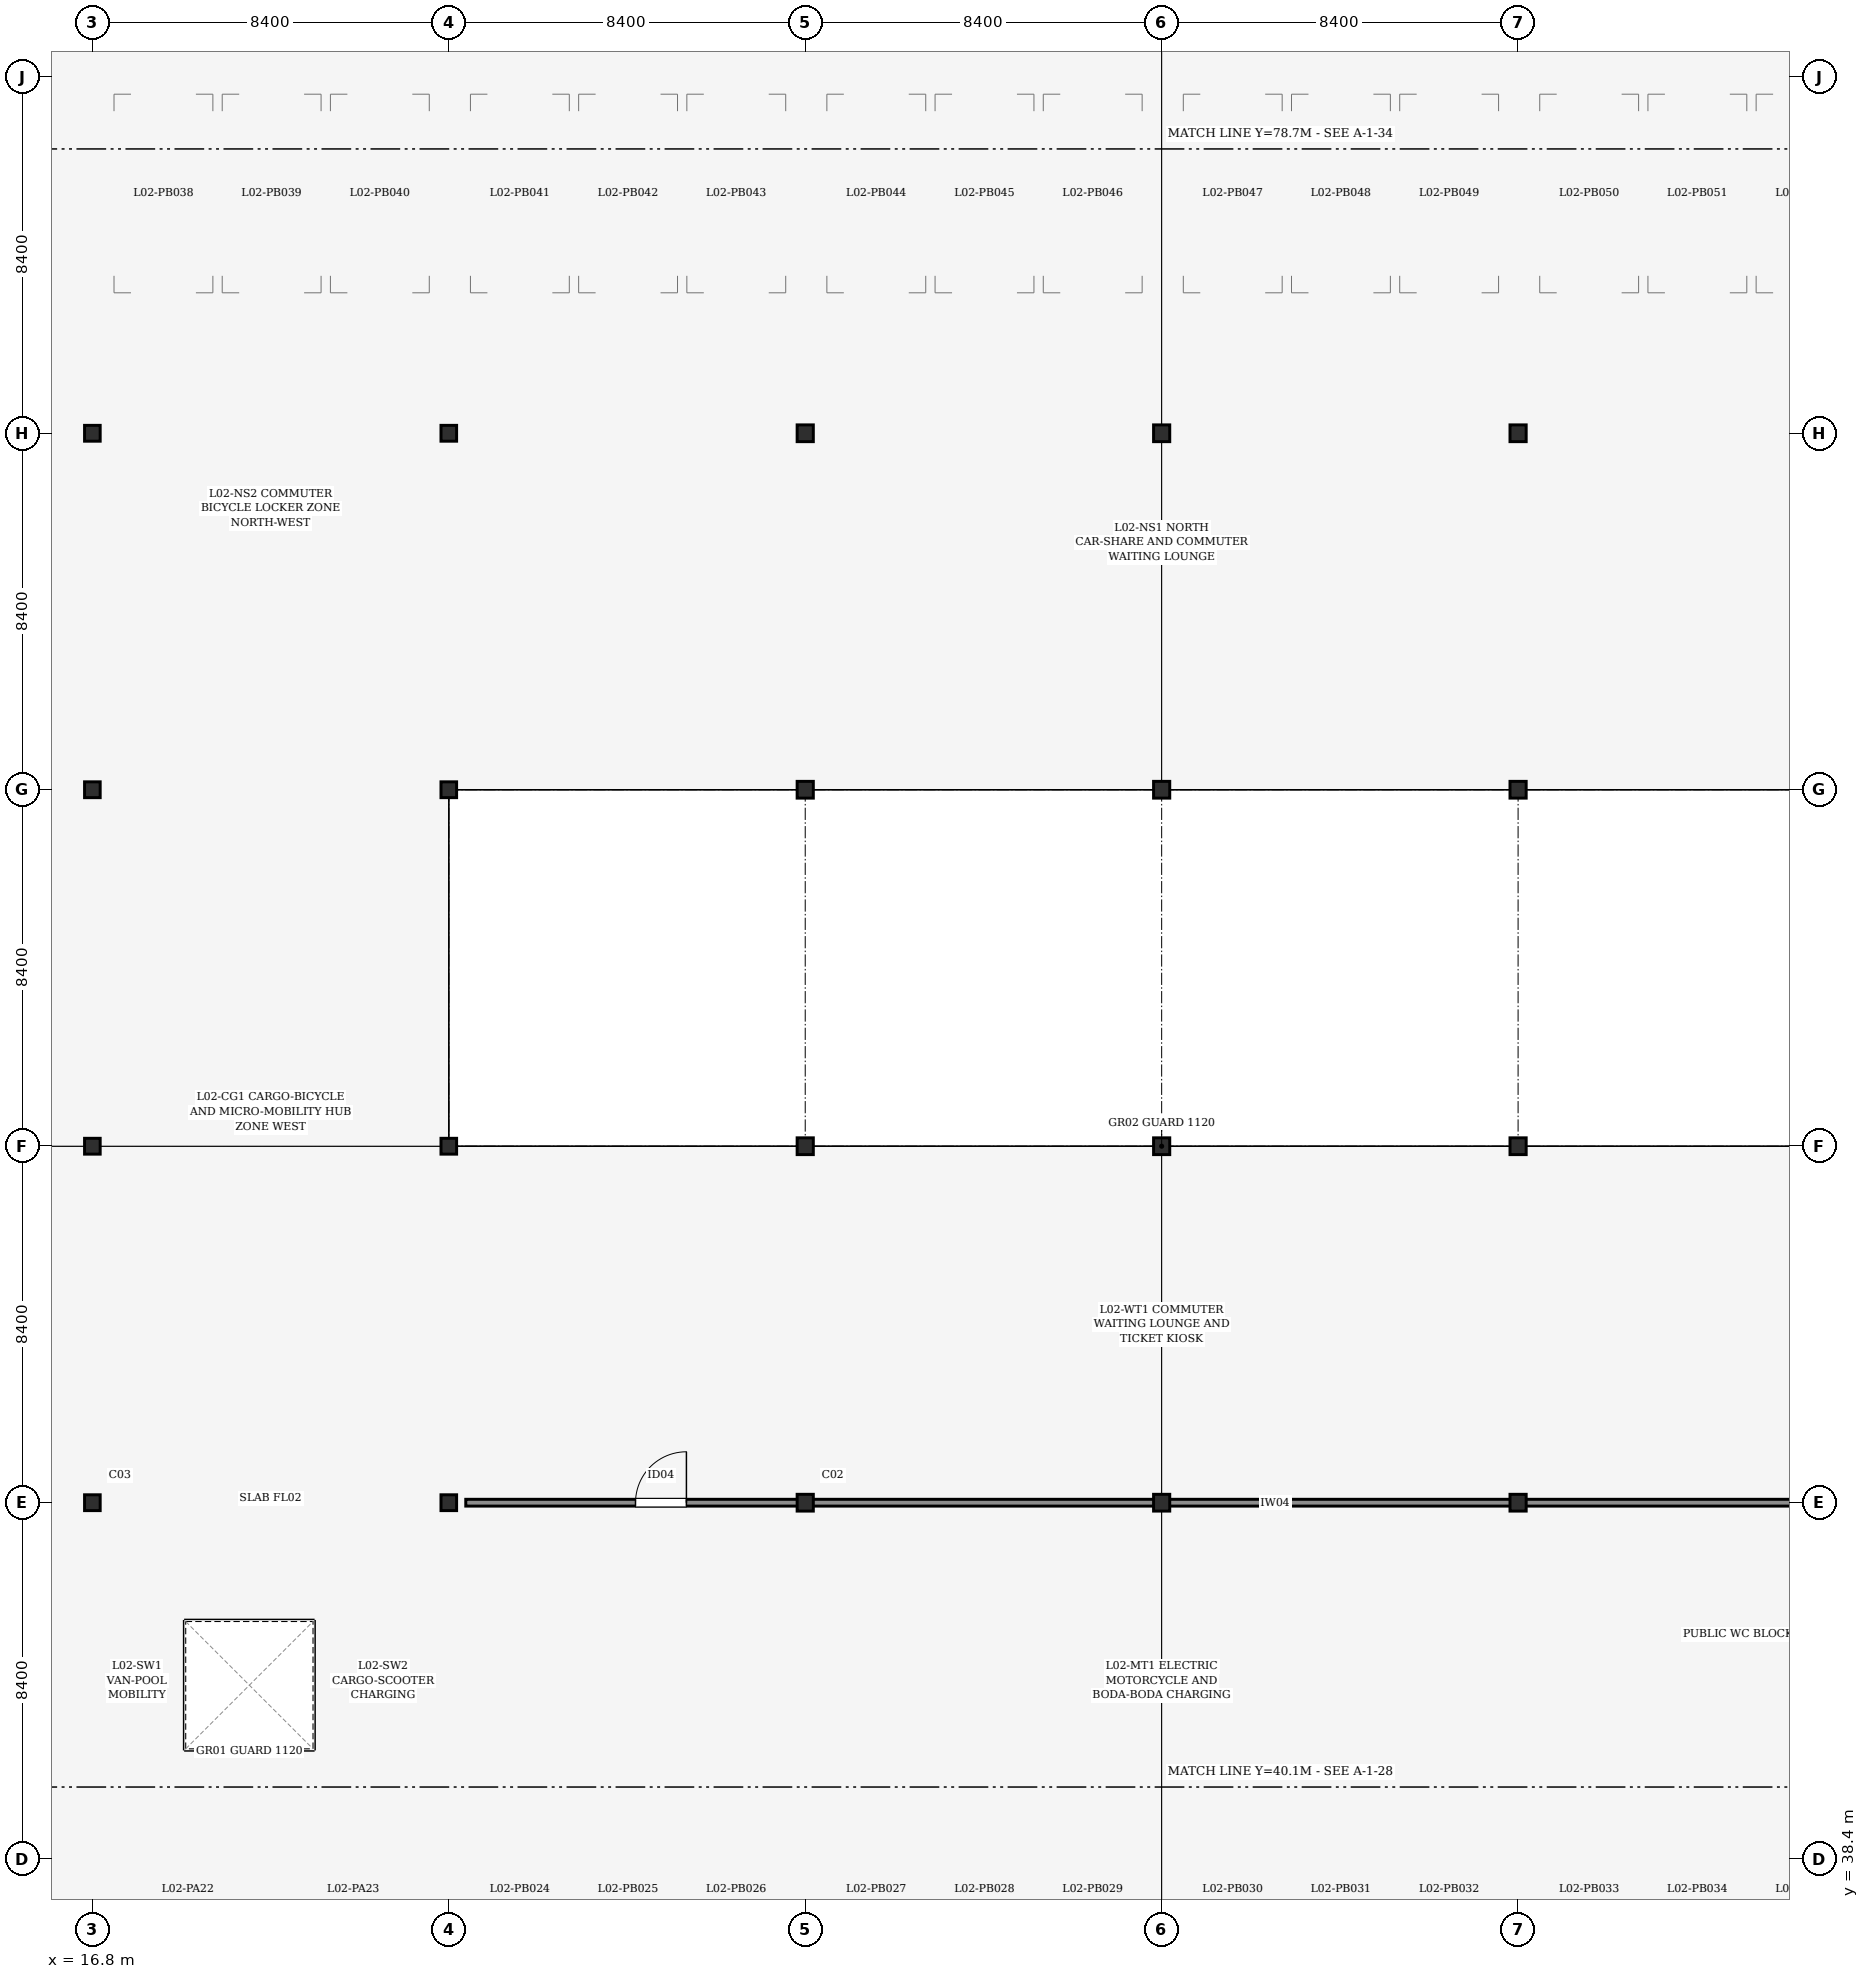
"""IFC4 building model, lengths in metres.
Left out: names, types, materials, properties, quantities, classifications, styles, units other than length and angle.
Written with IfcOpenShell. Run it as: python <this file> out.ifc"""

import sys

from ifc_helpers import new_model, si_unit, direction, frame, frame_2d, origin, origin_2d, place, context, subcontext, project, spatial, rectangle, i_section, extrude, element, fill, save


model = new_model("IFC4")
c1 = context("Model", 3, precision=1e-05, world=origin(), true_north=direction((0.0, 1.0)))
c2 = subcontext(c1, "Body", "Model", "MODEL_VIEW")
j1 = project(units=[si_unit("LENGTHUNIT", "METRE"), si_unit("PLANEANGLEUNIT", "RADIAN")], contexts=[c1])
p1 = place(None, origin())
s1 = spatial("IfcSite", under=j1, at=p1, CompositionType="ELEMENT")
p2 = place(p1, origin())
s2 = spatial("IfcBuilding", under=s1, at=p2, CompositionType="ELEMENT")
p3 = place(p2, frame((0.0, 0.0, 9.0)))
s3 = spatial("IfcBuildingStorey", under=s2, at=p3, CompositionType="ELEMENT", Elevation=9.0)
for number, where, z_axis, x_axis in (
    (1, (16.8, 38.4, 0.0), (0.0, 0.0, 1.0), (1.0, 0.0, 0.0)),
    (2, (16.8, 46.8, 0.0), (0.0, 0.0, 1.0), (1.0, 0.0, 0.0)),
    (3, (16.8, 55.2, 0.0), (0.0, 0.0, 1.0), (1.0, 0.0, 0.0)),
    (4, (16.8, 63.6, 0.0), (0.0, 0.0, 1.0), (1.0, 0.0, 0.0)),
    (5, (16.8, 72.0, 0.0), (0.0, 0.0, 1.0), (1.0, 0.0, 0.0)),
    (6, (16.8, 80.4, 0.0), (0.0, 0.0, 1.0), (1.0, 0.0, 0.0)),
    (7, (25.2, 38.4, 0.0), (0.0, 0.0, 1.0), (1.0, 0.0, 0.0)),
    (8, (25.2, 46.8, 0.0), (0.0, 0.0, 1.0), (1.0, 0.0, 0.0)),
    (9, (25.2, 55.2, 0.0), (0.0, 0.0, 1.0), (1.0, 0.0, 0.0)),
    (10, (25.2, 63.6, 0.0), (0.0, 0.0, 1.0), (1.0, 0.0, 0.0)),
    (11, (25.2, 72.0, 0.0), (0.0, 0.0, 1.0), (1.0, 0.0, 0.0)),
    (12, (25.2, 80.4, 0.0), (0.0, 0.0, 1.0), (1.0, 0.0, 0.0)),
):
    element("IfcColumn", number, at=place(p3, frame(where, z_axis=z_axis, x_axis=x_axis)), inside=s3, PredefinedType="COLUMN", context=c2, shape_type="SweptSolid", body=[
        extrude(i_section(OverallWidth=0.373, OverallDepth=0.368, WebThickness=0.014, FlangeThickness=0.024, FilletRadius=0.015, at=origin_2d()), origin(), (0.0, 0.0, 1.0), 3.6),
    ])
for number, where, z_axis, x_axis in (
    (13, (33.6, 38.4, 0.0), (0.0, 0.0, 1.0), (1.0, 0.0, 0.0)),
    (14, (33.6, 46.8, 0.0), (0.0, 0.0, 1.0), (1.0, 0.0, 0.0)),
    (15, (33.6, 55.2, 0.0), (0.0, 0.0, 1.0), (1.0, 0.0, 0.0)),
    (16, (33.6, 63.6, 0.0), (0.0, 0.0, 1.0), (1.0, 0.0, 0.0)),
    (17, (33.6, 72.0, 0.0), (0.0, 0.0, 1.0), (1.0, 0.0, 0.0)),
    (18, (33.6, 80.4, 0.0), (0.0, 0.0, 1.0), (1.0, 0.0, 0.0)),
    (19, (42.0, 38.4, 0.0), (0.0, 0.0, 1.0), (1.0, 0.0, 0.0)),
    (20, (42.0, 46.8, 0.0), (0.0, 0.0, 1.0), (1.0, 0.0, 0.0)),
    (21, (42.0, 55.2, 0.0), (0.0, 0.0, 1.0), (1.0, 0.0, 0.0)),
    (22, (42.0, 63.6, 0.0), (0.0, 0.0, 1.0), (1.0, 0.0, 0.0)),
    (23, (42.0, 72.0, 0.0), (0.0, 0.0, 1.0), (1.0, 0.0, 0.0)),
    (24, (42.0, 80.4, 0.0), (0.0, 0.0, 1.0), (1.0, 0.0, 0.0)),
    (25, (50.4, 38.4, 0.0), (0.0, 0.0, 1.0), (1.0, 0.0, 0.0)),
    (26, (50.4, 46.8, 0.0), (0.0, 0.0, 1.0), (1.0, 0.0, 0.0)),
    (27, (50.4, 55.2, 0.0), (0.0, 0.0, 1.0), (1.0, 0.0, 0.0)),
    (28, (50.4, 63.6, 0.0), (0.0, 0.0, 1.0), (1.0, 0.0, 0.0)),
    (29, (50.4, 72.0, 0.0), (0.0, 0.0, 1.0), (1.0, 0.0, 0.0)),
    (30, (50.4, 80.4, 0.0), (0.0, 0.0, 1.0), (1.0, 0.0, 0.0)),
):
    element("IfcColumn", number, at=place(p3, frame(where, z_axis=z_axis, x_axis=x_axis)), inside=s3, PredefinedType="COLUMN", context=c2, shape_type="SweptSolid", body=[
        extrude(i_section(OverallWidth=0.395, OverallDepth=0.381, WebThickness=0.018, FlangeThickness=0.03, FilletRadius=0.015, at=origin_2d()), origin(), (0.0, 0.0, 1.0), 3.6),
    ])
p4 = place(p3, frame((25.6, 46.8, 0.0), z_axis=(0.0, 0.0, 1.0), x_axis=(1.0, 0.0, 0.0)))
e31 = element("IfcWall", 31, at=p4, inside=s3, PredefinedType="PARTITIONING", context=c2, shape_type="SweptSolid", body=[
    extrude(rectangle(XDim=32.8, YDim=0.16, at=frame_2d((16.4, 0.0))), origin(), (0.0, 0.0, 1.0), 2.525),
])
p5 = place(p4, frame((4.0, 0.0, 0.0)))
e32 = element("IfcOpeningElement", 32, at=p5, cuts=e31, PredefinedType="OPENING", context=c2, shape_type="SweptSolid", body=[
    extrude(rectangle(XDim=1.2, YDim=2.15, at=frame_2d((0.6, 1.075))), frame((0.0, 0.09, 0.0), z_axis=(0.0, -1.0, 0.0), x_axis=(1.0, 0.0, 0.0)), (0.0, 0.0, 1.0), 0.18),
])
p6 = place(p5, origin())
e33 = element("IfcDoor", 33, at=p6, inside=s3, OperationType="SINGLE_SWING_RIGHT", PredefinedType="DOOR", context=c2, shape_type="SweptSolid", body=[
    extrude(rectangle(XDim=1.2, YDim=2.15, at=frame_2d((0.6, 1.075))), frame((0.0, 0.025, 0.0), z_axis=(0.0, -1.0, 0.0), x_axis=(1.0, 0.0, 0.0)), (0.0, 0.0, 1.0), 0.05),
])
fill(e32, e33)
save(model, sys.argv[1])
